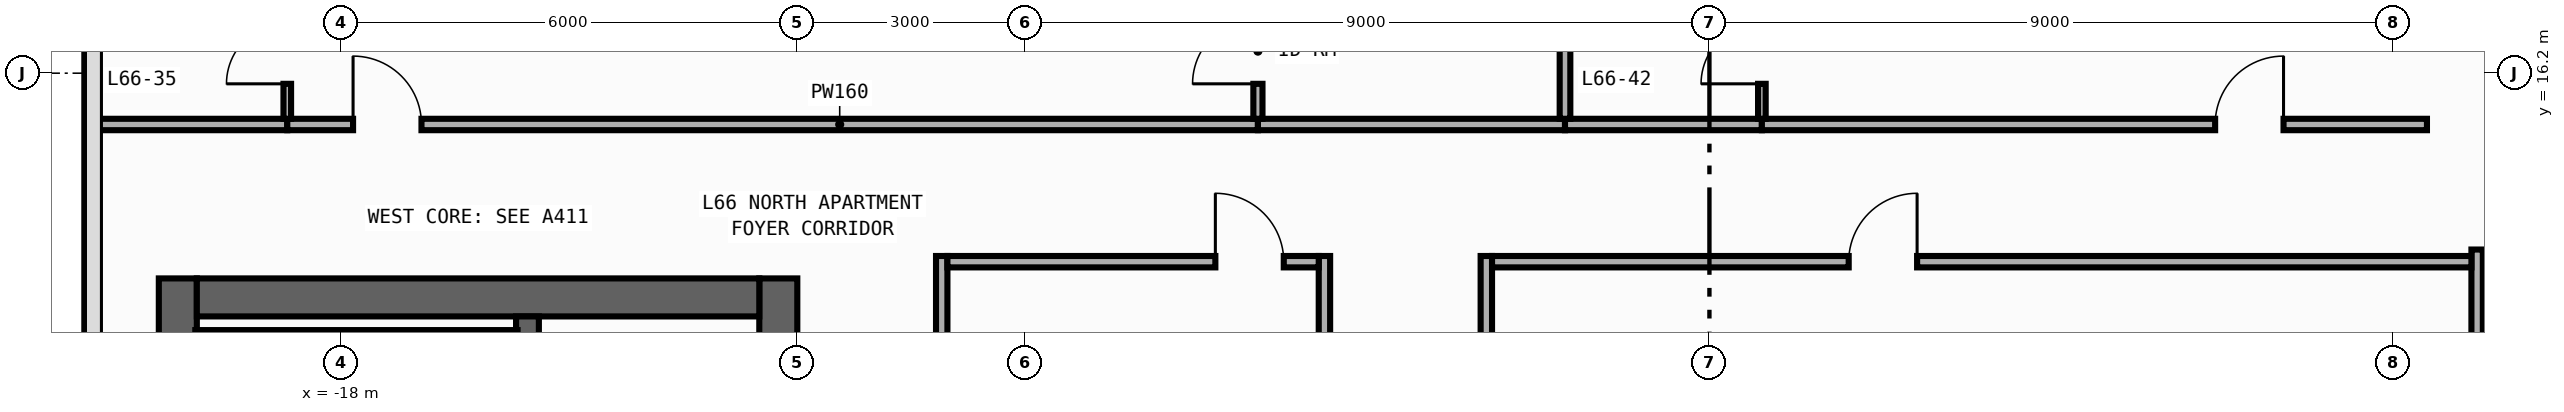
"""IFC4 building model, lengths in metres.
Left out: names, types, materials, properties, quantities, classifications, styles, units other than length and angle.
Written with IfcOpenShell. Run it as: python <this file> out.ifc"""

import sys

from ifc_helpers import new_model, si_unit, direction, frame, frame_2d, origin, place, context, subcontext, project, spatial, rectangle, extrude, element, fill, save


model = new_model("IFC4")
c1 = context("Model", 3, precision=1e-05, world=origin(), true_north=direction((0.0, 1.0)))
c2 = subcontext(c1, "Body", "Model", "MODEL_VIEW")
j1 = project(units=[si_unit("LENGTHUNIT", "METRE"), si_unit("PLANEANGLEUNIT", "RADIAN")], contexts=[c1])
p1 = place(None, origin())
s1 = spatial("IfcSite", under=j1, at=p1, CompositionType="ELEMENT")
p2 = place(p1, origin())
s2 = spatial("IfcBuilding", under=s1, at=p2, CompositionType="ELEMENT")
p3 = place(p2, frame((0.0, 0.0, 277.6)))
s3 = spatial("IfcBuildingStorey", under=s2, at=p3, CompositionType="ELEMENT", Elevation=277.6)
p4 = place(p3, frame((-20.15, -13.5, 0.0), z_axis=(0.0, 0.0, 1.0), x_axis=(0.0, 1.0, 0.0)))
e1 = element("IfcWall", 1, at=p4, inside=s3, PredefinedType="SHEAR", context=c2, shape_type="SweptSolid", body=[
    extrude(rectangle(XDim=27.0, YDim=0.5, at=frame_2d((13.5, 0.0))), origin(), (0.0, 0.0, 1.0), 3.54),
])
p5 = place(p3, frame((-12.25, -13.5, 0.0), z_axis=(0.0, 0.0, 1.0), x_axis=(0.0, 1.0, 0.0)))
e2 = element("IfcWall", 2, at=p5, inside=s3, PredefinedType="SHEAR", context=c2, shape_type="SweptSolid", body=[
    extrude(rectangle(XDim=27.0, YDim=0.5, at=frame_2d((13.5, 0.0))), origin(), (0.0, 0.0, 1.0), 3.54),
])
p6 = place(p5, frame((15.175, 0.0, 0.0)))
e3 = element("IfcOpeningElement", 3, at=p6, cuts=e2, PredefinedType="OPENING", context=c2, shape_type="SweptSolid", body=[
    extrude(rectangle(XDim=0.85, YDim=2.1, at=frame_2d((0.425, 1.05))), frame((0.0, 0.26, 0.0), z_axis=(0.0, -1.0, 0.0), x_axis=(1.0, 0.0, 0.0)), (0.0, 0.0, 1.0), 0.52),
])
p7 = place(p5, frame((21.275, 0.0, 0.0)))
e4 = element("IfcOpeningElement", 4, at=p7, cuts=e2, PredefinedType="OPENING", context=c2, shape_type="SweptSolid", body=[
    extrude(rectangle(XDim=0.85, YDim=2.1, at=frame_2d((0.425, 1.05))), frame((0.0, 0.26, 0.0), z_axis=(0.0, -1.0, 0.0), x_axis=(1.0, 0.0, 0.0)), (0.0, 0.0, 1.0), 0.52),
])
p8 = place(p5, frame((4.275, 0.0, 0.0)))
e5 = element("IfcOpeningElement", 5, at=p8, cuts=e2, PredefinedType="OPENING", context=c2, shape_type="SweptSolid", body=[
    extrude(rectangle(XDim=0.85, YDim=2.1, at=frame_2d((0.425, 1.05))), frame((0.0, 0.26, 0.0), z_axis=(0.0, -1.0, 0.0), x_axis=(1.0, 0.0, 0.0)), (0.0, 0.0, 1.0), 0.52),
])
p9 = place(p5, frame((10.275, 0.0, 0.0)))
e6 = element("IfcOpeningElement", 6, at=p9, cuts=e2, PredefinedType="OPENING", context=c2, shape_type="SweptSolid", body=[
    extrude(rectangle(XDim=0.85, YDim=2.1, at=frame_2d((0.425, 1.05))), frame((0.0, 0.26, 0.0), z_axis=(0.0, -1.0, 0.0), x_axis=(1.0, 0.0, 0.0)), (0.0, 0.0, 1.0), 0.52),
])
p10 = place(p5, frame((12.725, 0.0, 0.0)))
e7 = element("IfcOpeningElement", 7, at=p10, cuts=e2, PredefinedType="OPENING", context=c2, shape_type="SweptSolid", body=[
    extrude(rectangle(XDim=1.15, YDim=2.2, at=frame_2d((0.575, 1.1))), frame((0.0, 0.26, 0.0), z_axis=(0.0, -1.0, 0.0), x_axis=(1.0, 0.0, 0.0)), (0.0, 0.0, 1.0), 0.52),
])
p11 = place(p5, frame((1.625, 0.0, 0.0)))
e8 = element("IfcOpeningElement", 8, at=p11, cuts=e2, PredefinedType="OPENING", context=c2, shape_type="SweptSolid", body=[
    extrude(rectangle(XDim=0.85, YDim=2.1, at=frame_2d((0.425, 1.05))), frame((0.0, 0.26, 0.0), z_axis=(0.0, -1.0, 0.0), x_axis=(1.0, 0.0, 0.0)), (0.0, 0.0, 1.0), 0.52),
])
p12 = place(p3, frame((-19.9, 13.25, 0.0), z_axis=(0.0, 0.0, 1.0), x_axis=(1.0, 0.0, 0.0)))
e9 = element("IfcWall", 9, at=p12, inside=s3, PredefinedType="SHEAR", context=c2, shape_type="SweptSolid", body=[
    extrude(rectangle(XDim=7.4, YDim=0.5, at=frame_2d((3.7, 0.0))), origin(), (0.0, 0.0, 1.0), 3.54),
])
p13 = place(p3, frame((-15.55, -13.0, 0.0), z_axis=(0.0, 0.0, 1.0), x_axis=(0.0, 1.0, 0.0)))
e10 = element("IfcWall", 10, at=p13, inside=s3, PredefinedType="SHEAR", context=c2, shape_type="SweptSolid", body=[
    extrude(rectangle(XDim=26.0, YDim=0.3, at=frame_2d((13.0, 0.0))), origin(), (0.0, 0.0, 1.0), 3.54),
])
p14 = place(p13, frame((12.225, 0.0, 0.0)))
e11 = element("IfcOpeningElement", 11, at=p14, cuts=e10, PredefinedType="OPENING", context=c2, shape_type="SweptSolid", body=[
    extrude(rectangle(XDim=1.15, YDim=2.2, at=frame_2d((0.575, 1.1))), frame((0.0, 0.16, 0.0), z_axis=(0.0, -1.0, 0.0), x_axis=(1.0, 0.0, 0.0)), (0.0, 0.0, 1.0), 0.32),
])
p15 = place(p13, frame((1.125, 0.0, 0.0)))
e12 = element("IfcOpeningElement", 12, at=p15, cuts=e10, PredefinedType="OPENING", context=c2, shape_type="SweptSolid", body=[
    extrude(rectangle(XDim=0.85, YDim=2.1, at=frame_2d((0.425, 1.05))), frame((0.0, 0.16, 0.0), z_axis=(0.0, -1.0, 0.0), x_axis=(1.0, 0.0, 0.0)), (0.0, 0.0, 1.0), 0.32),
])
p16 = place(p3, frame((-19.92, 12.71, 0.0), z_axis=(0.0, 0.0, 1.0), x_axis=(1.0, 0.0, 0.0)))
e13 = element("IfcWall", 13, at=p16, inside=s3, PredefinedType="SHEAR", context=c2, shape_type="SweptSolid", body=[
    extrude(rectangle(XDim=4.24, YDim=0.22, at=frame_2d((2.12, 0.0))), origin(), (0.0, 0.0, 1.0), 3.54),
])
p17 = place(p3, frame((-10.1, -2.81, 0.0), z_axis=(0.0, 0.0, 1.0), x_axis=(0.0, 1.0, 0.0)))
e14 = element("IfcWall", 14, at=p17, inside=s3, PredefinedType="PARTITIONING", context=c2, shape_type="SweptSolid", body=[
    extrude(rectangle(XDim=16.605, YDim=0.15, at=frame_2d((8.302, 0.0))), origin(), (0.0, 0.0, 1.0), 3.54),
])
p18 = place(p17, frame((7.751, 0.0, 0.0)))
e15 = element("IfcOpeningElement", 15, at=p18, cuts=e14, PredefinedType="OPENING", context=c2, shape_type="SweptSolid", body=[
    extrude(rectangle(XDim=0.9, YDim=2.15, at=frame_2d((0.45, 1.075))), frame((0.0, 0.085, 0.0), z_axis=(0.0, -1.0, 0.0), x_axis=(1.0, 0.0, 0.0)), (0.0, 0.0, 1.0), 0.17),
])
p19 = place(p3, frame((10.1, -2.81, 0.0), z_axis=(0.0, 0.0, 1.0), x_axis=(0.0, 1.0, 0.0)))
e16 = element("IfcWall", 16, at=p19, inside=s3, PredefinedType="PARTITIONING", context=c2, shape_type="SweptSolid", body=[
    extrude(rectangle(XDim=16.69, YDim=0.15, at=frame_2d((8.345, 0.0))), origin(), (0.0, 0.0, 1.0), 3.54),
])
p20 = place(p19, frame((7.694, 0.0, 0.0)))
e17 = element("IfcOpeningElement", 17, at=p20, cuts=e16, PredefinedType="OPENING", context=c2, shape_type="SweptSolid", body=[
    extrude(rectangle(XDim=0.9, YDim=2.15, at=frame_2d((0.45, 1.075))), frame((0.0, 0.085, 0.0), z_axis=(0.0, -1.0, 0.0), x_axis=(1.0, 0.0, 0.0)), (0.0, 0.0, 1.0), 0.17),
])
p21 = place(p3, frame((-5.065, -2.66, 0.0), z_axis=(0.0, 0.0, 1.0), x_axis=(0.0, 1.0, 0.0)))
e18 = element("IfcWall", 18, at=p21, inside=s3, PredefinedType="PARTITIONING", context=c2, shape_type="SweptSolid", body=[
    extrude(rectangle(XDim=16.455, YDim=0.15, at=frame_2d((8.228, 0.0))), origin(), (0.0, 0.0, 1.0), 3.19),
])
p22 = place(p21, frame((7.677, 0.0, 0.0)))
e19 = element("IfcOpeningElement", 19, at=p22, cuts=e18, PredefinedType="OPENING", context=c2, shape_type="SweptSolid", body=[
    extrude(rectangle(XDim=0.9, YDim=2.15, at=frame_2d((0.45, 1.075))), frame((0.0, 0.085, 0.0), z_axis=(0.0, -1.0, 0.0), x_axis=(1.0, 0.0, 0.0)), (0.0, 0.0, 1.0), 0.17),
])
p23 = place(p3, frame((-2.935, -2.66, 0.0), z_axis=(0.0, 0.0, 1.0), x_axis=(0.0, 1.0, 0.0)))
e20 = element("IfcWall", 20, at=p23, inside=s3, PredefinedType="PARTITIONING", context=c2, shape_type="SweptSolid", body=[
    extrude(rectangle(XDim=16.455, YDim=0.15, at=frame_2d((8.228, 0.0))), origin(), (0.0, 0.0, 1.0), 3.54),
])
p24 = place(p23, frame((7.677, 0.0, 0.0)))
e21 = element("IfcOpeningElement", 21, at=p24, cuts=e20, PredefinedType="OPENING", context=c2, shape_type="SweptSolid", body=[
    extrude(rectangle(XDim=0.9, YDim=2.15, at=frame_2d((0.45, 1.075))), frame((0.0, 0.085, 0.0), z_axis=(0.0, -1.0, 0.0), x_axis=(1.0, 0.0, 0.0)), (0.0, 0.0, 1.0), 0.17),
])
p25 = place(p3, frame((-21.255, 15.525, 0.0), z_axis=(0.0, 0.0, 1.0), x_axis=(1.0, 0.0, 0.0)))
e22 = element("IfcWall", 22, at=p25, inside=s3, PredefinedType="PARTITIONING", context=c2, shape_type="SweptSolid", body=[
    extrude(rectangle(XDim=2.545, YDim=0.15, at=frame_2d((1.272, 0.0))), origin(), (0.0, 0.0, 1.0), 3.54),
])
p26 = place(p3, frame((-18.71, 15.525, 0.0), z_axis=(0.0, 0.0, 1.0), x_axis=(1.0, 0.0, 0.0)))
e23 = element("IfcWall", 23, at=p26, inside=s3, PredefinedType="PARTITIONING", context=c2, shape_type="SweptSolid", body=[
    extrude(rectangle(XDim=12.77, YDim=0.15, at=frame_2d((6.385, 0.0))), origin(), (0.0, 0.0, 1.0), 3.54),
])
p27 = place(p26, frame((0.865, 0.0, 0.0)))
e24 = element("IfcOpeningElement", 24, at=p27, cuts=e23, PredefinedType="OPENING", context=c2, shape_type="SweptSolid", body=[
    extrude(rectangle(XDim=0.9, YDim=2.15, at=frame_2d((0.45, 1.075))), frame((0.0, 0.085, 0.0), z_axis=(0.0, -1.0, 0.0), x_axis=(1.0, 0.0, 0.0)), (0.0, 0.0, 1.0), 0.17),
])
p28 = place(p3, frame((-5.94, 15.525, 0.0), z_axis=(0.0, 0.0, 1.0), x_axis=(1.0, 0.0, 0.0)))
e25 = element("IfcWall", 25, at=p28, inside=s3, PredefinedType="PARTITIONING", context=c2, shape_type="SweptSolid", body=[
    extrude(rectangle(XDim=4.04, YDim=0.15, at=frame_2d((2.02, 0.0))), origin(), (0.0, 0.0, 1.0), 3.54),
])
p29 = place(p3, frame((-1.9, 15.525, 0.0), z_axis=(0.0, 0.0, 1.0), x_axis=(1.0, 0.0, 0.0)))
e26 = element("IfcWall", 26, at=p29, inside=s3, PredefinedType="PARTITIONING", context=c2, shape_type="SweptSolid", body=[
    extrude(rectangle(XDim=2.59, YDim=0.15, at=frame_2d((1.295, 0.0))), origin(), (0.0, 0.0, 1.0), 3.54),
])
p30 = place(p3, frame((0.69, 15.525, 0.0), z_axis=(0.0, 0.0, 1.0), x_axis=(1.0, 0.0, 0.0)))
e27 = element("IfcWall", 27, at=p30, inside=s3, PredefinedType="PARTITIONING", context=c2, shape_type="SweptSolid", body=[
    extrude(rectangle(XDim=8.75, YDim=0.15, at=frame_2d((4.375, 0.0))), origin(), (0.0, 0.0, 1.0), 3.54),
])
p31 = place(p30, frame((5.963, 0.0, 0.0)))
e28 = element("IfcOpeningElement", 28, at=p31, cuts=e27, PredefinedType="OPENING", context=c2, shape_type="SweptSolid", body=[
    extrude(rectangle(XDim=0.9, YDim=2.15, at=frame_2d((0.45, 1.075))), frame((0.0, 0.085, 0.0), z_axis=(0.0, -1.0, 0.0), x_axis=(1.0, 0.0, 0.0)), (0.0, 0.0, 1.0), 0.17),
])
p32 = place(p3, frame((-10.025, 13.72, 0.0), z_axis=(0.0, 0.0, 1.0), x_axis=(1.0, 0.0, 0.0)))
e29 = element("IfcWall", 29, at=p32, inside=s3, PredefinedType="PARTITIONING", context=c2, shape_type="SweptSolid", body=[
    extrude(rectangle(XDim=4.885, YDim=0.15, at=frame_2d((2.442, 0.0))), origin(), (0.0, 0.0, 1.0), 3.54),
])
p33 = place(p32, frame((3.525, 0.0, 0.0)))
e30 = element("IfcOpeningElement", 30, at=p33, cuts=e29, PredefinedType="OPENING", context=c2, shape_type="SweptSolid", body=[
    extrude(rectangle(XDim=0.9, YDim=2.15, at=frame_2d((0.45, 1.075))), frame((0.0, 0.085, 0.0), z_axis=(0.0, -1.0, 0.0), x_axis=(1.0, 0.0, 0.0)), (0.0, 0.0, 1.0), 0.17),
])
p34 = place(p3, frame((-2.86, 13.72, 0.0), z_axis=(0.0, 0.0, 1.0), x_axis=(1.0, 0.0, 0.0)))
e31 = element("IfcWall", 31, at=p34, inside=s3, PredefinedType="PARTITIONING", context=c2, shape_type="SweptSolid", body=[
    extrude(rectangle(XDim=12.885, YDim=0.15, at=frame_2d((6.442, 0.0))), origin(), (0.0, 0.0, 1.0), 3.54),
])
p35 = place(p34, frame((4.692, 0.0, 0.0)))
e32 = element("IfcOpeningElement", 32, at=p35, cuts=e31, PredefinedType="OPENING", context=c2, shape_type="SweptSolid", body=[
    extrude(rectangle(XDim=0.9, YDim=2.15, at=frame_2d((0.45, 1.075))), frame((0.0, 0.085, 0.0), z_axis=(0.0, -1.0, 0.0), x_axis=(1.0, 0.0, 0.0)), (0.0, 0.0, 1.0), 0.17),
])
p36 = place(p3, frame((-18.71, 15.6, 0.0), z_axis=(0.0, 0.0, 1.0), x_axis=(0.0, 1.0, 0.0)))
e33 = element("IfcWall", 33, at=p36, inside=s3, PredefinedType="PARTITIONING", context=c2, shape_type="SweptSolid", body=[
    extrude(rectangle(XDim=2.5, YDim=0.1, at=frame_2d((1.25, 0.0))), origin(), (0.0, 0.0, 1.0), 3.54),
])
p37 = place(p36, frame((0.46, 0.0, 0.0)))
e34 = element("IfcOpeningElement", 34, at=p37, cuts=e33, PredefinedType="OPENING", context=c2, shape_type="SweptSolid", body=[
    extrude(rectangle(XDim=0.8, YDim=2.1, at=frame_2d((0.4, 1.05))), frame((0.0, 0.06, 0.0), z_axis=(0.0, -1.0, 0.0), x_axis=(1.0, 0.0, 0.0)), (0.0, 0.0, 1.0), 0.12),
])
p38 = place(p3, frame((-5.94, 15.6, 0.0), z_axis=(0.0, 0.0, 1.0), x_axis=(0.0, 1.0, 0.0)))
e35 = element("IfcWall", 35, at=p38, inside=s3, PredefinedType="PARTITIONING", context=c2, shape_type="SweptSolid", body=[
    extrude(rectangle(XDim=4.5, YDim=0.12, at=frame_2d((2.25, 0.0))), origin(), (0.0, 0.0, 1.0), 3.54),
])
p39 = place(p38, frame((0.46, 0.0, 0.0)))
e36 = element("IfcOpeningElement", 36, at=p39, cuts=e35, PredefinedType="OPENING", context=c2, shape_type="SweptSolid", body=[
    extrude(rectangle(XDim=0.86, YDim=2.15, at=frame_2d((0.43, 1.075))), frame((0.0, 0.07, 0.0), z_axis=(0.0, -1.0, 0.0), x_axis=(1.0, 0.0, 0.0)), (0.0, 0.0, 1.0), 0.14),
])
p40 = place(p3, frame((-1.9, 15.6, 0.0), z_axis=(0.0, 0.0, 1.0), x_axis=(0.0, 1.0, 0.0)))
e37 = element("IfcWall", 37, at=p40, inside=s3, PredefinedType="PARTITIONING", context=c2, shape_type="SweptSolid", body=[
    extrude(rectangle(XDim=2.5, YDim=0.14, at=frame_2d((1.25, 0.0))), origin(), (0.0, 0.0, 1.0), 3.54),
])
p41 = place(p3, frame((0.69, 15.6, 0.0), z_axis=(0.0, 0.0, 1.0), x_axis=(0.0, 1.0, 0.0)))
e38 = element("IfcWall", 38, at=p41, inside=s3, PredefinedType="PARTITIONING", context=c2, shape_type="SweptSolid", body=[
    extrude(rectangle(XDim=2.5, YDim=0.1, at=frame_2d((1.25, 0.0))), origin(), (0.0, 0.0, 1.0), 3.54),
])
p42 = place(p41, frame((0.46, 0.0, 0.0)))
e39 = element("IfcOpeningElement", 39, at=p42, cuts=e38, PredefinedType="OPENING", context=c2, shape_type="SweptSolid", body=[
    extrude(rectangle(XDim=0.8, YDim=2.1, at=frame_2d((0.4, 1.05))), frame((0.0, 0.06, 0.0), z_axis=(0.0, -1.0, 0.0), x_axis=(1.0, 0.0, 0.0)), (0.0, 0.0, 1.0), 0.12),
])
p43 = place(p27, origin())
e40 = element("IfcDoor", 40, at=p43, inside=s3, OperationType="SINGLE_SWING_LEFT", PredefinedType="DOOR", context=c2, shape_type="SweptSolid", body=[
    extrude(rectangle(XDim=0.9, YDim=2.15, at=frame_2d((0.45, 1.075))), frame((0.0, 0.025, 0.0), z_axis=(0.0, -1.0, 0.0), x_axis=(1.0, 0.0, 0.0)), (0.0, 0.0, 1.0), 0.05),
])
fill(e24, e40)
p44 = place(p31, origin())
e41 = element("IfcDoor", 41, at=p44, inside=s3, OperationType="SINGLE_SWING_RIGHT", PredefinedType="DOOR", context=c2, shape_type="SweptSolid", body=[
    extrude(rectangle(XDim=0.9, YDim=2.15, at=frame_2d((0.45, 1.075))), frame((0.0, 0.025, 0.0), z_axis=(0.0, -1.0, 0.0), x_axis=(1.0, 0.0, 0.0)), (0.0, 0.0, 1.0), 0.05),
])
fill(e28, e41)
p45 = place(p33, origin())
e42 = element("IfcDoor", 42, at=p45, inside=s3, OperationType="SINGLE_SWING_LEFT", PredefinedType="DOOR", context=c2, shape_type="SweptSolid", body=[
    extrude(rectangle(XDim=0.9, YDim=2.15, at=frame_2d((0.45, 1.075))), frame((0.0, 0.025, 0.0), z_axis=(0.0, -1.0, 0.0), x_axis=(1.0, 0.0, 0.0)), (0.0, 0.0, 1.0), 0.05),
])
fill(e30, e42)
p46 = place(p35, origin())
e43 = element("IfcDoor", 43, at=p46, inside=s3, OperationType="SINGLE_SWING_RIGHT", PredefinedType="DOOR", context=c2, shape_type="SweptSolid", body=[
    extrude(rectangle(XDim=0.9, YDim=2.15, at=frame_2d((0.45, 1.075))), frame((0.0, 0.025, 0.0), z_axis=(0.0, -1.0, 0.0), x_axis=(1.0, 0.0, 0.0)), (0.0, 0.0, 1.0), 0.05),
])
fill(e32, e43)
p47 = place(p37, origin())
e44 = element("IfcDoor", 44, at=p47, inside=s3, OperationType="SINGLE_SWING_LEFT", PredefinedType="DOOR", context=c2, shape_type="SweptSolid", body=[
    extrude(rectangle(XDim=0.8, YDim=2.1, at=frame_2d((0.4, 1.05))), frame((0.0, 0.025, 0.0), z_axis=(0.0, -1.0, 0.0), x_axis=(1.0, 0.0, 0.0)), (0.0, 0.0, 1.0), 0.05),
])
fill(e34, e44)
p48 = place(p39, origin())
e45 = element("IfcDoor", 45, at=p48, inside=s3, OperationType="SINGLE_SWING_LEFT", PredefinedType="DOOR", context=c2, shape_type="SweptSolid", body=[
    extrude(rectangle(XDim=0.86, YDim=2.15, at=frame_2d((0.43, 1.075))), frame((0.0, 0.025, 0.0), z_axis=(0.0, -1.0, 0.0), x_axis=(1.0, 0.0, 0.0)), (0.0, 0.0, 1.0), 0.05),
])
fill(e36, e45)
p49 = place(p42, origin())
e46 = element("IfcDoor", 46, at=p49, inside=s3, OperationType="SINGLE_SWING_LEFT", PredefinedType="DOOR", context=c2, shape_type="SweptSolid", body=[
    extrude(rectangle(XDim=0.8, YDim=2.1, at=frame_2d((0.4, 1.05))), frame((0.0, 0.025, 0.0), z_axis=(0.0, -1.0, 0.0), x_axis=(1.0, 0.0, 0.0)), (0.0, 0.0, 1.0), 0.05),
])
fill(e39, e46)
save(model, sys.argv[1])
